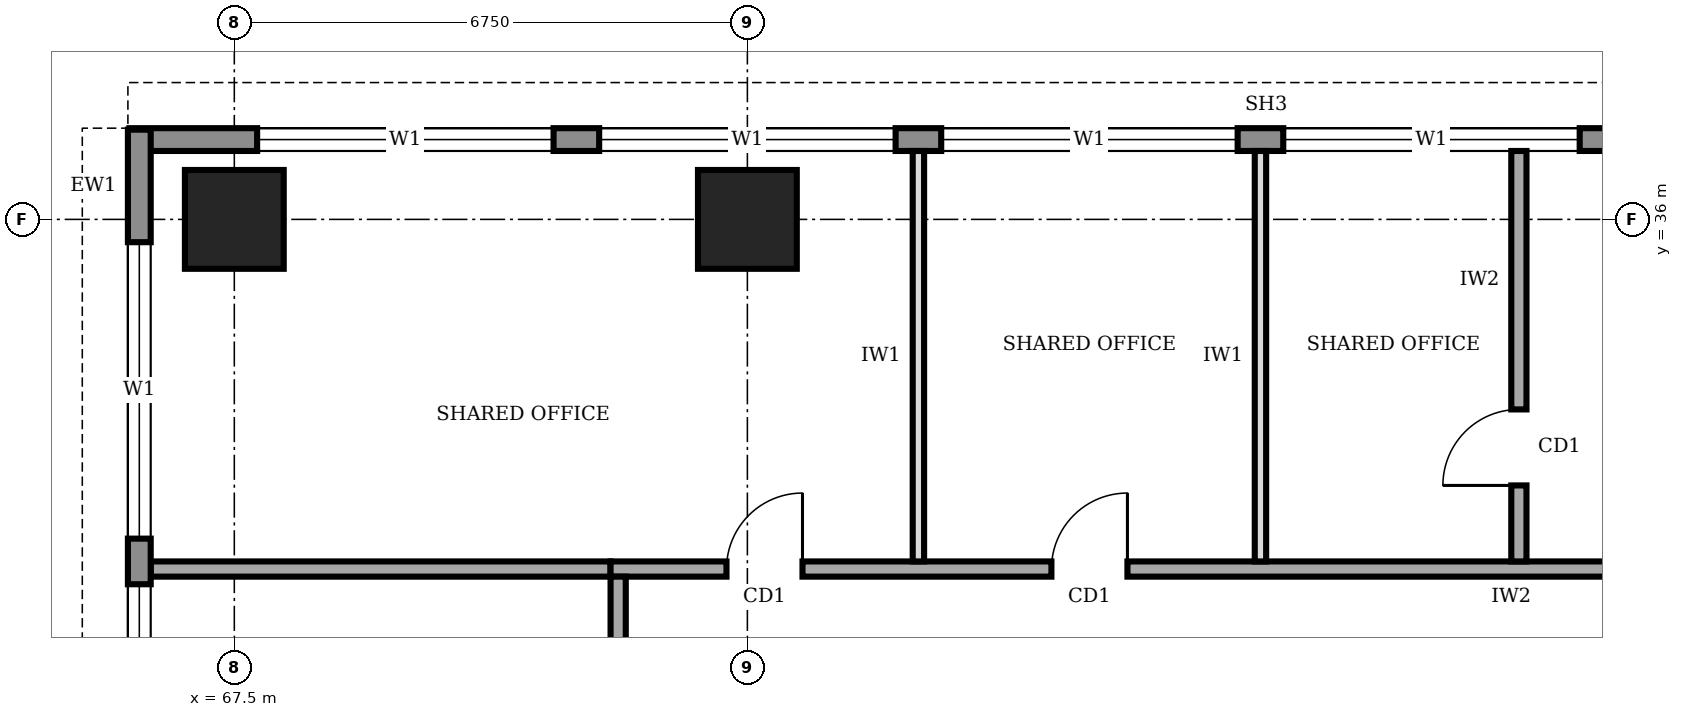
"""IFC4 building model, lengths in metres.
Left out: names, types, materials, properties, quantities, classifications, styles, units other than length and angle.
Written with IfcOpenShell. Run it as: python <this file> out.ifc"""

import sys

from ifc_helpers import new_model, si_unit, direction, frame, frame_2d, origin, origin_2d, place, context, subcontext, project, spatial, rectangle, extrude, element, fill, save


model = new_model("IFC4")
c1 = context("Model", 3, precision=1e-05, world=origin(), true_north=direction((0.0, 1.0)))
c2 = subcontext(c1, "Body", "Model", "MODEL_VIEW")
j1 = project(units=[si_unit("LENGTHUNIT", "METRE"), si_unit("PLANEANGLEUNIT", "RADIAN")], contexts=[c1])
p1 = place(None, origin())
s1 = spatial("IfcSite", under=j1, at=p1, CompositionType="ELEMENT")
p2 = place(p1, origin())
s2 = spatial("IfcBuilding", under=s1, at=p2, CompositionType="ELEMENT")
p3 = place(p2, frame((0.0, 0.0, 209.0)))
s3 = spatial("IfcBuildingStorey", under=s2, at=p3, CompositionType="ELEMENT", Elevation=209.0)
for number, where, z_axis, x_axis in (
    (1, (67.5, 36.0, 0.0), (0.0, 0.0, 1.0), (1.0, 0.0, 0.0)),
    (2, (74.25, 36.0, 0.0), (0.0, 0.0, 1.0), (1.0, 0.0, 0.0)),
):
    element("IfcColumn", number, at=place(p3, frame(where, z_axis=z_axis, x_axis=x_axis)), inside=s3, PredefinedType="COLUMN", context=c2, shape_type="SweptSolid", body=[
        extrude(rectangle(XDim=1.3, YDim=1.3, at=origin_2d()), origin(), (0.0, 0.0, 1.0), 4.0),
    ])
p4 = place(p3, frame((96.03, 37.05, 0.0), z_axis=(0.0, 0.0, 1.0), x_axis=(-1.0, 0.0, 0.0)))
e3 = element("IfcWall", 3, at=p4, inside=s3, PredefinedType="STANDARD", context=c2, shape_type="SweptSolid", body=[
    extrude(rectangle(XDim=29.91, YDim=0.3, at=frame_2d((14.955, 0.0))), origin(), (0.0, 0.0, 1.0), 3.75),
])
p5 = place(p4, frame((24.33, 0.0, 0.9)))
e4 = element("IfcOpeningElement", 4, at=p5, cuts=e3, PredefinedType="OPENING", context=c2, shape_type="SweptSolid", body=[
    extrude(rectangle(XDim=3.9, YDim=2.2, at=frame_2d((1.95, 1.1))), frame((0.0, 0.16, 0.0), z_axis=(0.0, -1.0, 0.0), x_axis=(1.0, 0.0, 0.0)), (0.0, 0.0, 1.0), 0.32),
])
p6 = place(p4, frame((19.83, 0.0, 0.9)))
e5 = element("IfcOpeningElement", 5, at=p6, cuts=e3, PredefinedType="OPENING", context=c2, shape_type="SweptSolid", body=[
    extrude(rectangle(XDim=3.9, YDim=2.2, at=frame_2d((1.95, 1.1))), frame((0.0, 0.16, 0.0), z_axis=(0.0, -1.0, 0.0), x_axis=(1.0, 0.0, 0.0)), (0.0, 0.0, 1.0), 0.32),
])
p7 = place(p4, frame((15.33, 0.0, 0.9)))
e6 = element("IfcOpeningElement", 6, at=p7, cuts=e3, PredefinedType="OPENING", context=c2, shape_type="SweptSolid", body=[
    extrude(rectangle(XDim=3.9, YDim=2.2, at=frame_2d((1.95, 1.1))), frame((0.0, 0.16, 0.0), z_axis=(0.0, -1.0, 0.0), x_axis=(1.0, 0.0, 0.0)), (0.0, 0.0, 1.0), 0.32),
])
p8 = place(p4, frame((10.83, 0.0, 0.9)))
e7 = element("IfcOpeningElement", 7, at=p8, cuts=e3, PredefinedType="OPENING", context=c2, shape_type="SweptSolid", body=[
    extrude(rectangle(XDim=3.9, YDim=2.2, at=frame_2d((1.95, 1.1))), frame((0.0, 0.16, 0.0), z_axis=(0.0, -1.0, 0.0), x_axis=(1.0, 0.0, 0.0)), (0.0, 0.0, 1.0), 0.32),
])
p9 = place(p4, frame((6.33, 0.0, 0.9)))
e8 = element("IfcOpeningElement", 8, at=p9, cuts=e3, PredefinedType="OPENING", context=c2, shape_type="SweptSolid", body=[
    extrude(rectangle(XDim=3.9, YDim=2.2, at=frame_2d((1.95, 1.1))), frame((0.0, 0.16, 0.0), z_axis=(0.0, -1.0, 0.0), x_axis=(1.0, 0.0, 0.0)), (0.0, 0.0, 1.0), 0.32),
])
p10 = place(p4, frame((1.83, 0.0, 0.9)))
e9 = element("IfcOpeningElement", 9, at=p10, cuts=e3, PredefinedType="OPENING", context=c2, shape_type="SweptSolid", body=[
    extrude(rectangle(XDim=3.9, YDim=2.2, at=frame_2d((1.95, 1.1))), frame((0.0, 0.16, 0.0), z_axis=(0.0, -1.0, 0.0), x_axis=(1.0, 0.0, 0.0)), (0.0, 0.0, 1.0), 0.32),
])
p11 = place(p3, frame((66.25, 37.18, 0.0), z_axis=(0.0, 0.0, 1.0), x_axis=(0.0, -1.0, 0.0)))
e10 = element("IfcWall", 10, at=p11, inside=s3, PredefinedType="STANDARD", context=c2, shape_type="SweptSolid", body=[
    extrude(rectangle(XDim=33.86, YDim=0.3, at=frame_2d((16.93, 0.0))), origin(), (0.0, 0.0, 1.0), 3.75),
])
p12 = place(p11, frame((28.48, 0.0, 0.9)))
e11 = element("IfcOpeningElement", 11, at=p12, cuts=e10, PredefinedType="OPENING", context=c2, shape_type="SweptSolid", body=[
    extrude(rectangle(XDim=3.9, YDim=2.2, at=frame_2d((1.95, 1.1))), frame((0.0, 0.16, 0.0), z_axis=(0.0, -1.0, 0.0), x_axis=(1.0, 0.0, 0.0)), (0.0, 0.0, 1.0), 0.32),
])
p13 = place(p11, frame((23.98, 0.0, 0.9)))
e12 = element("IfcOpeningElement", 12, at=p13, cuts=e10, PredefinedType="OPENING", context=c2, shape_type="SweptSolid", body=[
    extrude(rectangle(XDim=3.9, YDim=2.2, at=frame_2d((1.95, 1.1))), frame((0.0, 0.16, 0.0), z_axis=(0.0, -1.0, 0.0), x_axis=(1.0, 0.0, 0.0)), (0.0, 0.0, 1.0), 0.32),
])
p14 = place(p11, frame((19.48, 0.0, 0.9)))
e13 = element("IfcOpeningElement", 13, at=p14, cuts=e10, PredefinedType="OPENING", context=c2, shape_type="SweptSolid", body=[
    extrude(rectangle(XDim=3.9, YDim=2.2, at=frame_2d((1.95, 1.1))), frame((0.0, 0.16, 0.0), z_axis=(0.0, -1.0, 0.0), x_axis=(1.0, 0.0, 0.0)), (0.0, 0.0, 1.0), 0.32),
])
p15 = place(p11, frame((14.98, 0.0, 0.9)))
e14 = element("IfcOpeningElement", 14, at=p15, cuts=e10, PredefinedType="OPENING", context=c2, shape_type="SweptSolid", body=[
    extrude(rectangle(XDim=3.9, YDim=2.2, at=frame_2d((1.95, 1.1))), frame((0.0, 0.16, 0.0), z_axis=(0.0, -1.0, 0.0), x_axis=(1.0, 0.0, 0.0)), (0.0, 0.0, 1.0), 0.32),
])
p16 = place(p11, frame((10.48, 0.0, 0.9)))
e15 = element("IfcOpeningElement", 15, at=p16, cuts=e10, PredefinedType="OPENING", context=c2, shape_type="SweptSolid", body=[
    extrude(rectangle(XDim=3.9, YDim=2.2, at=frame_2d((1.95, 1.1))), frame((0.0, 0.16, 0.0), z_axis=(0.0, -1.0, 0.0), x_axis=(1.0, 0.0, 0.0)), (0.0, 0.0, 1.0), 0.32),
])
p17 = place(p11, frame((5.98, 0.0, 0.9)))
e16 = element("IfcOpeningElement", 16, at=p17, cuts=e10, PredefinedType="OPENING", context=c2, shape_type="SweptSolid", body=[
    extrude(rectangle(XDim=3.9, YDim=2.2, at=frame_2d((1.95, 1.1))), frame((0.0, 0.16, 0.0), z_axis=(0.0, -1.0, 0.0), x_axis=(1.0, 0.0, 0.0)), (0.0, 0.0, 1.0), 0.32),
])
p18 = place(p11, frame((1.48, 0.0, 0.9)))
e17 = element("IfcOpeningElement", 17, at=p18, cuts=e10, PredefinedType="OPENING", context=c2, shape_type="SweptSolid", body=[
    extrude(rectangle(XDim=3.9, YDim=2.2, at=frame_2d((1.95, 1.1))), frame((0.0, 0.16, 0.0), z_axis=(0.0, -1.0, 0.0), x_axis=(1.0, 0.0, 0.0)), (0.0, 0.0, 1.0), 0.32),
])
p19 = place(p3, frame((89.35, 31.4, 0.0), z_axis=(0.0, 0.0, 1.0), x_axis=(-1.0, 0.0, 0.0)))
e18 = element("IfcWall", 18, at=p19, inside=s3, PredefinedType="SOLIDWALL", context=c2, shape_type="SweptSolid", body=[
    extrude(rectangle(XDim=16.9, YDim=0.2, at=frame_2d((8.45, 0.0))), origin(), (0.0, 0.0, 1.0), 3.75),
])
p20 = place(p19, frame((14.375, 0.0, 0.0)))
e19 = element("IfcOpeningElement", 19, at=p20, cuts=e18, PredefinedType="OPENING", context=c2, shape_type="SweptSolid", body=[
    extrude(rectangle(XDim=1.0, YDim=2.1, at=frame_2d((0.5, 1.05))), frame((0.0, 0.11, 0.0), z_axis=(0.0, -1.0, 0.0), x_axis=(1.0, 0.0, 0.0)), (0.0, 0.0, 1.0), 0.22),
])
p21 = place(p19, frame((10.1, 0.0, 0.0)))
e20 = element("IfcOpeningElement", 20, at=p21, cuts=e18, PredefinedType="OPENING", context=c2, shape_type="SweptSolid", body=[
    extrude(rectangle(XDim=1.0, YDim=2.1, at=frame_2d((0.5, 1.05))), frame((0.0, 0.11, 0.0), z_axis=(0.0, -1.0, 0.0), x_axis=(1.0, 0.0, 0.0)), (0.0, 0.0, 1.0), 0.22),
])
p22 = place(p3, frame((72.55, 31.3, 0.0), z_axis=(0.0, 0.0, 1.0), x_axis=(0.0, -1.0, 0.0)))
e21 = element("IfcWall", 21, at=p22, inside=s3, PredefinedType="SOLIDWALL", context=c2, shape_type="SweptSolid", body=[
    extrude(rectangle(XDim=23.8, YDim=0.2, at=frame_2d((11.9, 0.0))), origin(), (0.0, 0.0, 1.0), 3.75),
])
p23 = place(p22, frame((18.05, 0.0, 0.0)))
e22 = element("IfcOpeningElement", 22, at=p23, cuts=e21, PredefinedType="OPENING", context=c2, shape_type="SweptSolid", body=[
    extrude(rectangle(XDim=1.0, YDim=2.1, at=frame_2d((0.5, 1.05))), frame((0.0, 0.11, 0.0), z_axis=(0.0, -1.0, 0.0), x_axis=(1.0, 0.0, 0.0)), (0.0, 0.0, 1.0), 0.22),
])
p24 = place(p22, frame((6.05, 0.0, 0.0)))
e23 = element("IfcOpeningElement", 23, at=p24, cuts=e21, PredefinedType="OPENING", context=c2, shape_type="SweptSolid", body=[
    extrude(rectangle(XDim=1.0, YDim=2.1, at=frame_2d((0.5, 1.05))), frame((0.0, 0.11, 0.0), z_axis=(0.0, -1.0, 0.0), x_axis=(1.0, 0.0, 0.0)), (0.0, 0.0, 1.0), 0.22),
])
p25 = place(p3, frame((84.4, 31.5, 0.0), z_axis=(0.0, 0.0, 1.0), x_axis=(0.0, 1.0, 0.0)))
e24 = element("IfcWall", 24, at=p25, inside=s3, PredefinedType="SOLIDWALL", context=c2, shape_type="SweptSolid", body=[
    extrude(rectangle(XDim=5.4, YDim=0.2, at=frame_2d((2.7, 0.0))), origin(), (0.0, 0.0, 1.0), 3.75),
])
p26 = place(p25, frame((1.0, 0.0, 0.0)))
e25 = element("IfcOpeningElement", 25, at=p26, cuts=e24, PredefinedType="OPENING", context=c2, shape_type="SweptSolid", body=[
    extrude(rectangle(XDim=1.0, YDim=2.1, at=frame_2d((0.5, 1.05))), frame((0.0, 0.11, 0.0), z_axis=(0.0, -1.0, 0.0), x_axis=(1.0, 0.0, 0.0)), (0.0, 0.0, 1.0), 0.22),
])
p27 = place(p3, frame((66.4, 31.4, 0.0), z_axis=(0.0, 0.0, 1.0), x_axis=(1.0, 0.0, 0.0)))
e26 = element("IfcWall", 26, at=p27, inside=s3, PredefinedType="SOLIDWALL", context=c2, shape_type="SweptSolid", body=[
    extrude(rectangle(XDim=6.05, YDim=0.2, at=frame_2d((3.025, 0.0))), origin(), (0.0, 0.0, 1.0), 3.75),
])
for number, where, z_axis, x_axis in (
    (27, (76.5, 31.5, 0.0), (0.0, 0.0, 1.0), (0.0, 1.0, 0.0)),
    (28, (81.0, 31.5, 0.0), (0.0, 0.0, 1.0), (0.0, 1.0, 0.0)),
):
    element("IfcWall", number, at=place(p3, frame(where, z_axis=z_axis, x_axis=x_axis)), inside=s3, PredefinedType="PARTITIONING", context=c2, shape_type="SweptSolid", body=[
        extrude(rectangle(XDim=5.4, YDim=0.15, at=frame_2d((2.7, 0.0))), origin(), (0.0, 0.0, 1.0), 3.75),
    ])
p28 = place(p5, origin())
e29 = element("IfcWindow", 29, at=p28, inside=s3, PartitioningType="SINGLE_PANEL", PredefinedType="WINDOW", context=c2, shape_type="SweptSolid", body=[
    extrude(rectangle(XDim=3.9, YDim=2.2, at=frame_2d((1.95, 1.1))), frame((0.0, 0.03, 0.0), z_axis=(0.0, -1.0, 0.0), x_axis=(1.0, 0.0, 0.0)), (0.0, 0.0, 1.0), 0.06),
])
fill(e4, e29)
p29 = place(p6, origin())
e30 = element("IfcWindow", 30, at=p29, inside=s3, PartitioningType="SINGLE_PANEL", PredefinedType="WINDOW", context=c2, shape_type="SweptSolid", body=[
    extrude(rectangle(XDim=3.9, YDim=2.2, at=frame_2d((1.95, 1.1))), frame((0.0, 0.03, 0.0), z_axis=(0.0, -1.0, 0.0), x_axis=(1.0, 0.0, 0.0)), (0.0, 0.0, 1.0), 0.06),
])
fill(e5, e30)
p30 = place(p7, origin())
e31 = element("IfcWindow", 31, at=p30, inside=s3, PartitioningType="SINGLE_PANEL", PredefinedType="WINDOW", context=c2, shape_type="SweptSolid", body=[
    extrude(rectangle(XDim=3.9, YDim=2.2, at=frame_2d((1.95, 1.1))), frame((0.0, 0.03, 0.0), z_axis=(0.0, -1.0, 0.0), x_axis=(1.0, 0.0, 0.0)), (0.0, 0.0, 1.0), 0.06),
])
fill(e6, e31)
p31 = place(p8, origin())
e32 = element("IfcWindow", 32, at=p31, inside=s3, PartitioningType="SINGLE_PANEL", PredefinedType="WINDOW", context=c2, shape_type="SweptSolid", body=[
    extrude(rectangle(XDim=3.9, YDim=2.2, at=frame_2d((1.95, 1.1))), frame((0.0, 0.03, 0.0), z_axis=(0.0, -1.0, 0.0), x_axis=(1.0, 0.0, 0.0)), (0.0, 0.0, 1.0), 0.06),
])
fill(e7, e32)
p32 = place(p17, origin())
e33 = element("IfcWindow", 33, at=p32, inside=s3, PartitioningType="SINGLE_PANEL", PredefinedType="WINDOW", context=c2, shape_type="SweptSolid", body=[
    extrude(rectangle(XDim=3.9, YDim=2.2, at=frame_2d((1.95, 1.1))), frame((0.0, 0.03, 0.0), z_axis=(0.0, -1.0, 0.0), x_axis=(1.0, 0.0, 0.0)), (0.0, 0.0, 1.0), 0.06),
])
fill(e16, e33)
p33 = place(p18, origin())
e34 = element("IfcWindow", 34, at=p33, inside=s3, PartitioningType="SINGLE_PANEL", PredefinedType="WINDOW", context=c2, shape_type="SweptSolid", body=[
    extrude(rectangle(XDim=3.9, YDim=2.2, at=frame_2d((1.95, 1.1))), frame((0.0, 0.03, 0.0), z_axis=(0.0, -1.0, 0.0), x_axis=(1.0, 0.0, 0.0)), (0.0, 0.0, 1.0), 0.06),
])
fill(e17, e34)
p34 = place(p20, frame((1.0, 0.0, 0.0), z_axis=(0.0, 0.0, 1.0), x_axis=(-1.0, 0.0, 0.0)))
e35 = element("IfcDoor", 35, at=p34, inside=s3, OperationType="SINGLE_SWING_RIGHT", PredefinedType="DOOR", context=c2, shape_type="SweptSolid", body=[
    extrude(rectangle(XDim=1.0, YDim=2.1, at=frame_2d((0.5, 1.05))), frame((0.0, 0.025, 0.0), z_axis=(0.0, -1.0, 0.0), x_axis=(1.0, 0.0, 0.0)), (0.0, 0.0, 1.0), 0.05),
])
fill(e19, e35)
p35 = place(p21, frame((1.0, 0.0, 0.0), z_axis=(0.0, 0.0, 1.0), x_axis=(-1.0, 0.0, 0.0)))
e36 = element("IfcDoor", 36, at=p35, inside=s3, OperationType="SINGLE_SWING_RIGHT", PredefinedType="DOOR", context=c2, shape_type="SweptSolid", body=[
    extrude(rectangle(XDim=1.0, YDim=2.1, at=frame_2d((0.5, 1.05))), frame((0.0, 0.025, 0.0), z_axis=(0.0, -1.0, 0.0), x_axis=(1.0, 0.0, 0.0)), (0.0, 0.0, 1.0), 0.05),
])
fill(e20, e36)
p36 = place(p26, origin())
e37 = element("IfcDoor", 37, at=p36, inside=s3, OperationType="SINGLE_SWING_LEFT", PredefinedType="DOOR", context=c2, shape_type="SweptSolid", body=[
    extrude(rectangle(XDim=1.0, YDim=2.1, at=frame_2d((0.5, 1.05))), frame((0.0, 0.025, 0.0), z_axis=(0.0, -1.0, 0.0), x_axis=(1.0, 0.0, 0.0)), (0.0, 0.0, 1.0), 0.05),
])
fill(e25, e37)
save(model, sys.argv[1])
